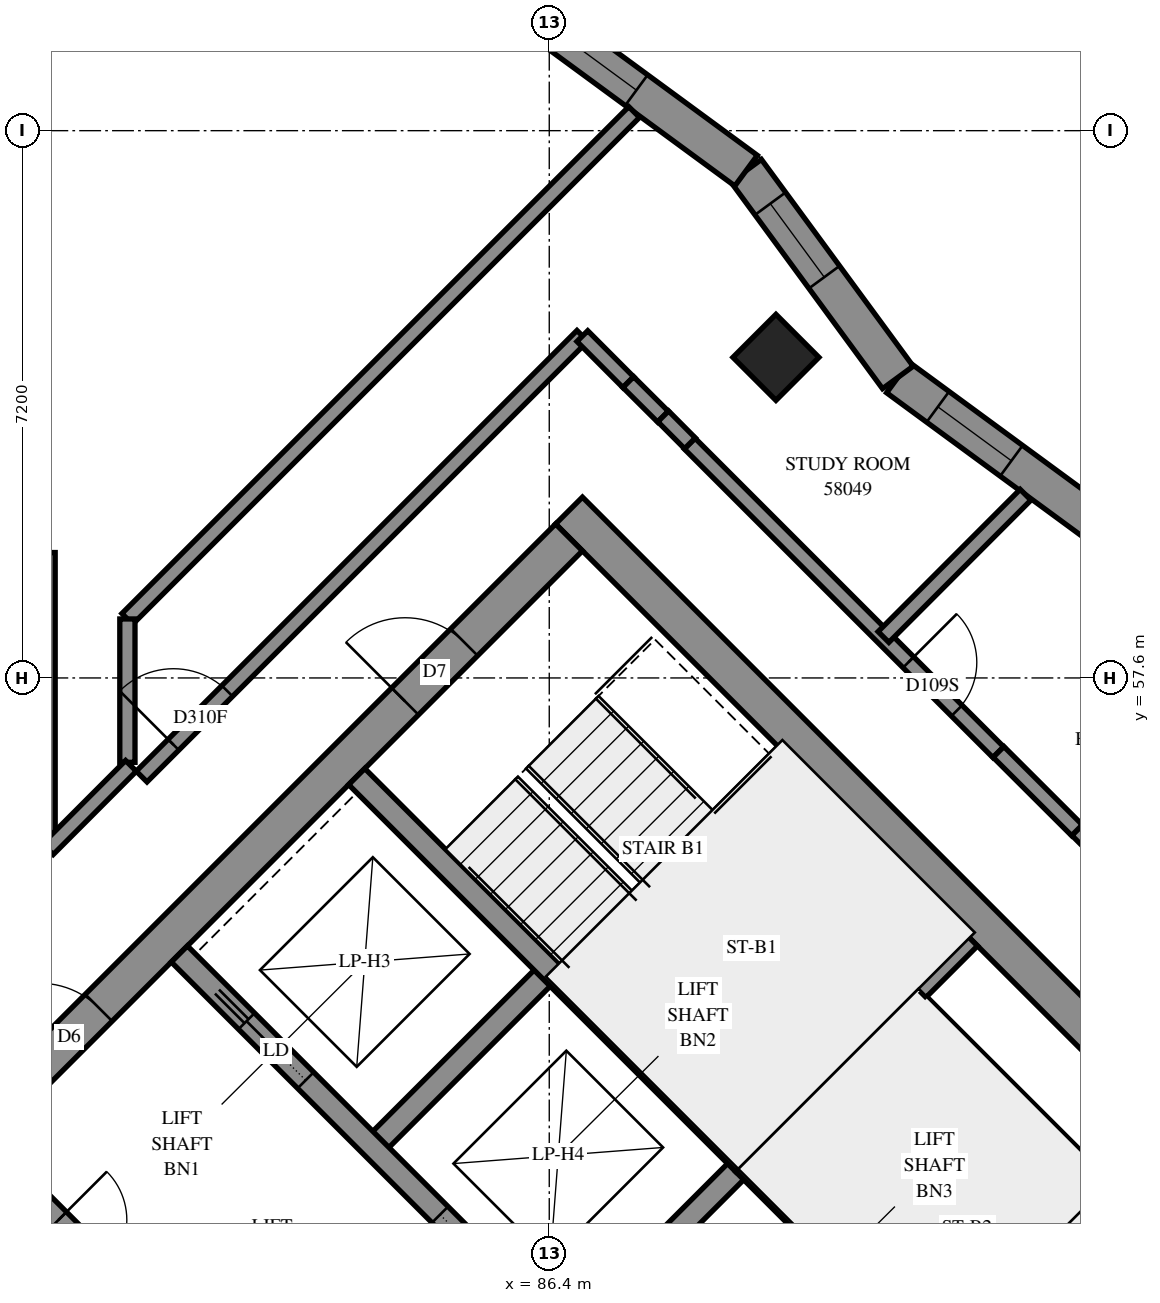
"""IFC4 building model, lengths in metres.
Left out: names, types, materials, properties, quantities, classifications, styles, units other than length and angle.
Written with IfcOpenShell. Run it as: python <this file> out.ifc"""

import sys

from ifc_helpers import new_model, si_unit, direction, frame, frame_2d, origin, origin_2d, place, context, subcontext, project, spatial, polyline, rectangle, outline, extrude, element, fill, save


model = new_model("IFC4")
c1 = context("Model", 3, precision=1e-05, world=origin(), true_north=direction((0.0, 1.0)))
c2 = subcontext(c1, "Body", "Model", "MODEL_VIEW")
j1 = project(units=[si_unit("LENGTHUNIT", "METRE"), si_unit("PLANEANGLEUNIT", "RADIAN")], contexts=[c1])
p1 = place(None, origin())
s1 = spatial("IfcSite", under=j1, at=p1, CompositionType="ELEMENT")
p2 = place(p1, origin())
s2 = spatial("IfcBuilding", under=s1, at=p2, CompositionType="ELEMENT")
p3 = place(p2, frame((0.0, 0.0, 213.4)))
s3 = spatial("IfcBuildingStorey", under=s2, at=p3, CompositionType="ELEMENT", Elevation=213.4)
p4 = place(p3, frame((89.382, 61.818, 0.0), z_axis=(0.0, 0.0, 1.0), x_axis=(0.7071067812, -0.7071067812, 0.0)))
e1 = element("IfcColumn", 1, at=p4, inside=s3, PredefinedType="COLUMN", context=c2, shape_type="SweptSolid", body=[
    extrude(rectangle(XDim=0.8, YDim=0.8, at=origin_2d()), origin(), (0.0, 0.0, 1.0), 3.1),
])
p5 = place(p3, frame((86.66, 59.802, -0.3), z_axis=(0.0, 0.0, 1.0), x_axis=(0.7071067812, -0.7071067812, 0.0)))
e2 = element("IfcWall", 2, at=p5, inside=s3, PredefinedType="SHEAR", context=c2, shape_type="SweptSolid", body=[
    extrude(rectangle(XDim=15.4, YDim=0.5, at=frame_2d((7.7, 0.0))), origin(), (0.0, 0.0, 1.0), 2.7),
])
p6 = place(p5, frame((10.5, 0.0, 0.3)))
e3 = element("IfcOpeningElement", 3, at=p6, cuts=e2, PredefinedType="OPENING", context=c2, shape_type="SweptSolid", body=[
    extrude(rectangle(XDim=0.8, YDim=2.1, at=frame_2d((0.4, 1.05))), frame((0.0, 0.26, 0.0), z_axis=(0.0, -1.0, 0.0), x_axis=(1.0, 0.0, 0.0)), (0.0, 0.0, 1.0), 0.52),
])
p7 = place(p3, frame((76.478, 49.267, -0.3), z_axis=(0.0, 0.0, 1.0), x_axis=(0.7071067812, 0.7071067812, 0.0)))
e4 = element("IfcWall", 4, at=p7, inside=s3, PredefinedType="SHEAR", context=c2, shape_type="SweptSolid", body=[
    extrude(rectangle(XDim=14.4, YDim=0.5, at=frame_2d((7.2, 0.0))), origin(), (0.0, 0.0, 1.0), 2.7),
])
p8 = place(p7, frame((4.55, 0.0, 0.3)))
e5 = element("IfcOpeningElement", 5, at=p8, cuts=e4, PredefinedType="OPENING", context=c2, shape_type="SweptSolid", body=[
    extrude(rectangle(XDim=1.1, YDim=2.1, at=frame_2d((0.55, 1.05))), frame((0.0, 0.26, 0.0), z_axis=(0.0, -1.0, 0.0), x_axis=(1.0, 0.0, 0.0)), (0.0, 0.0, 1.0), 0.52),
])
p9 = place(p7, frame((11.35, 0.0, 0.3)))
e6 = element("IfcOpeningElement", 6, at=p9, cuts=e4, PredefinedType="OPENING", context=c2, shape_type="SweptSolid", body=[
    extrude(rectangle(XDim=1.1, YDim=2.1, at=frame_2d((0.55, 1.05))), frame((0.0, 0.26, 0.0), z_axis=(0.0, -1.0, 0.0), x_axis=(1.0, 0.0, 0.0)), (0.0, 0.0, 1.0), 0.52),
])
p10 = place(p3, frame((84.079, 51.423, 0.0), z_axis=(0.0, 0.0, 1.0), x_axis=(0.7071219326, 0.7070916295, 0.0)))
e7 = element("IfcWall", 7, at=p10, inside=s3, PredefinedType="SOLIDWALL", context=c2, shape_type="SweptSolid", body=[
    extrude(rectangle(XDim=3.3, YDim=0.3, at=frame_2d((1.65, 0.0))), origin(), (0.0, 0.0, 1.0), 3.1),
])
p11 = place(p3, frame((86.625, 48.878, 0.0), z_axis=(0.0, 0.0, 1.0), x_axis=(0.7071067812, 0.7071067812, 0.0)))
e8 = element("IfcWall", 8, at=p11, inside=s3, PredefinedType="SOLIDWALL", context=c2, shape_type="SweptSolid", body=[
    extrude(rectangle(XDim=3.3, YDim=0.3, at=frame_2d((1.65, 0.0))), origin(), (0.0, 0.0, 1.0), 3.1),
])
p12 = place(p3, frame((78.988, 51.423, 0.0), z_axis=(0.0, 0.0, 1.0), x_axis=(0.7071067812, -0.7071067812, 0.0)))
e9 = element("IfcWall", 9, at=p12, inside=s3, PredefinedType="SOLIDWALL", context=c2, shape_type="SweptSolid", body=[
    extrude(rectangle(XDim=14.4, YDim=0.3, at=frame_2d((7.2, 0.0))), origin(), (0.0, 0.0, 1.0), 3.1),
])
p13 = place(p12, frame((1.35, 0.0, 0.0)))
e10 = element("IfcOpeningElement", 10, at=p13, cuts=e9, PredefinedType="OPENING", context=c2, shape_type="SweptSolid", body=[
    extrude(rectangle(XDim=0.9, YDim=2.1, at=frame_2d((0.45, 1.05))), frame((0.0, 0.16, 0.0), z_axis=(0.0, -1.0, 0.0), x_axis=(1.0, 0.0, 0.0)), (0.0, 0.0, 1.0), 0.32),
])
p14 = place(p12, frame((4.95, 0.0, 0.0)))
e11 = element("IfcOpeningElement", 11, at=p14, cuts=e9, PredefinedType="OPENING", context=c2, shape_type="SweptSolid", body=[
    extrude(rectangle(XDim=0.9, YDim=2.1, at=frame_2d((0.45, 1.05))), frame((0.0, 0.16, 0.0), z_axis=(0.0, -1.0, 0.0), x_axis=(1.0, 0.0, 0.0)), (0.0, 0.0, 1.0), 0.32),
])
p15 = place(p12, frame((8.55, 0.0, 0.0)))
e12 = element("IfcOpeningElement", 12, at=p15, cuts=e9, PredefinedType="OPENING", context=c2, shape_type="SweptSolid", body=[
    extrude(rectangle(XDim=0.9, YDim=2.1, at=frame_2d((0.45, 1.05))), frame((0.0, 0.16, 0.0), z_axis=(0.0, -1.0, 0.0), x_axis=(1.0, 0.0, 0.0)), (0.0, 0.0, 1.0), 0.32),
])
p16 = place(p12, frame((12.05, 0.0, 0.0)))
e13 = element("IfcOpeningElement", 13, at=p16, cuts=e9, PredefinedType="OPENING", context=c2, shape_type="SweptSolid", body=[
    extrude(rectangle(XDim=1.1, YDim=2.1, at=frame_2d((0.55, 1.05))), frame((0.0, 0.16, 0.0), z_axis=(0.0, -1.0, 0.0), x_axis=(1.0, 0.0, 0.0)), (0.0, 0.0, 1.0), 0.32),
])
p17 = place(p3, frame((81.534, 53.969, 0.0), z_axis=(0.0, 0.0, 1.0), x_axis=(0.707103309, -0.7071102534, 0.0)))
e14 = element("IfcWall", 14, at=p17, inside=s3, PredefinedType="SOLIDWALL", context=c2, shape_type="SweptSolid", body=[
    extrude(rectangle(XDim=14.4, YDim=0.3, at=frame_2d((7.2, 0.0))), origin(), (0.0, 0.0, 1.0), 3.1),
])
p18 = place(p17, frame((1.25, 0.0, 0.0)))
e15 = element("IfcOpeningElement", 15, at=p18, cuts=e14, PredefinedType="OPENING", context=c2, shape_type="SweptSolid", body=[
    extrude(rectangle(XDim=1.1, YDim=2.1, at=frame_2d((0.55, 1.05))), frame((0.0, 0.16, 0.0), z_axis=(0.0, -1.0, 0.0), x_axis=(1.0, 0.0, 0.0)), (0.0, 0.0, 1.0), 0.32),
])
p19 = place(p17, frame((4.85, 0.0, 0.0)))
e16 = element("IfcOpeningElement", 16, at=p19, cuts=e14, PredefinedType="OPENING", context=c2, shape_type="SweptSolid", body=[
    extrude(rectangle(XDim=1.1, YDim=2.1, at=frame_2d((0.55, 1.05))), frame((0.0, 0.16, 0.0), z_axis=(0.0, -1.0, 0.0), x_axis=(1.0, 0.0, 0.0)), (0.0, 0.0, 1.0), 0.32),
])
p20 = place(p17, frame((8.45, 0.0, 0.0)))
e17 = element("IfcOpeningElement", 17, at=p20, cuts=e14, PredefinedType="OPENING", context=c2, shape_type="SweptSolid", body=[
    extrude(rectangle(XDim=1.1, YDim=2.1, at=frame_2d((0.55, 1.05))), frame((0.0, 0.16, 0.0), z_axis=(0.0, -1.0, 0.0), x_axis=(1.0, 0.0, 0.0)), (0.0, 0.0, 1.0), 0.32),
])
p21 = place(p17, frame((12.05, 0.0, 0.0)))
e18 = element("IfcOpeningElement", 18, at=p21, cuts=e14, PredefinedType="OPENING", context=c2, shape_type="SweptSolid", body=[
    extrude(rectangle(XDim=1.1, YDim=2.1, at=frame_2d((0.55, 1.05))), frame((0.0, 0.16, 0.0), z_axis=(0.0, -1.0, 0.0), x_axis=(1.0, 0.0, 0.0)), (0.0, 0.0, 1.0), 0.32),
])
for number, where, z_axis, x_axis in (
    (19, (83.867, 56.302, 0.0), (0.0, 0.0, 1.0), (0.707, -0.707, 0.0)),
    (20, (88.958, 51.211, 0.0), (0.0, 0.0, 1.0), (0.707, -0.707, 0.0)),
):
    element("IfcWall", number, at=place(p3, frame(where, z_axis=z_axis, x_axis=x_axis)), inside=s3, PredefinedType="SOLIDWALL", context=c2, shape_type="SweptSolid", body=[
        extrude(rectangle(XDim=7.2, YDim=0.3, at=frame_2d((3.6, 0.0))), origin(), (0.0, 0.0, 1.0), 3.1),
    ])
p22 = place(p3, frame((88.958, 51.211, 0.0), z_axis=(0.0, 0.0, 1.0), x_axis=(0.7071067812, 0.7071067812, 0.0)))
e21 = element("IfcWall", 21, at=p22, inside=s3, PredefinedType="SOLIDWALL", context=c2, shape_type="SweptSolid", body=[
    extrude(rectangle(XDim=4.2, YDim=0.3, at=frame_2d((2.1, 0.0))), origin(), (0.0, 0.0, 1.0), 3.1),
])
p23 = place(p3, frame((93.707, 59.556, 0.0), z_axis=(0.0, 0.0, 1.0), x_axis=(-0.8061901555, 0.5916565162, 0.0)))
e22 = element("IfcWall", 22, at=p23, inside=s3, PredefinedType="SOLIDWALL", context=c2, shape_type="SweptSolid", body=[
    extrude(outline(polyline([(-0.038, -0.25), (3.337, -0.25), (3.413, 0.25), (0.038, 0.25), (-0.038, -0.25)])), origin(), (0.0, 0.0, 1.0), 3.1),
])
p24 = place(p23, frame((1.522, 0.0, 0.45)))
e23 = element("IfcOpeningElement", 23, at=p24, cuts=e22, PredefinedType="OPENING", context=c2, shape_type="SweptSolid", body=[
    extrude(rectangle(XDim=1.2, YDim=2.5, at=frame_2d((0.6, 1.25))), frame((0.0, 0.26, 0.0), z_axis=(0.0, -1.0, 0.0), x_axis=(1.0, 0.0, 0.0)), (0.0, 0.0, 1.0), 0.52),
])
p25 = place(p3, frame((90.986, 61.553, 0.0), z_axis=(0.0, 0.0, 1.0), x_axis=(-0.5916565162, 0.8061901555, 0.0)))
e24 = element("IfcWall", 24, at=p25, inside=s3, PredefinedType="SOLIDWALL", context=c2, shape_type="SweptSolid", body=[
    extrude(outline(polyline([(0.038, -0.25), (3.413, -0.25), (3.337, 0.25), (-0.038, 0.25), (0.038, -0.25)])), origin(), (0.0, 0.0, 1.0), 3.1),
])
p26 = place(p25, frame((1.637, 0.0, 0.45)))
e25 = element("IfcOpeningElement", 25, at=p26, cuts=e24, PredefinedType="OPENING", context=c2, shape_type="SweptSolid", body=[
    extrude(rectangle(XDim=1.2, YDim=2.5, at=frame_2d((0.6, 1.25))), frame((0.0, 0.26, 0.0), z_axis=(0.0, -1.0, 0.0), x_axis=(1.0, 0.0, 0.0)), (0.0, 0.0, 1.0), 0.52),
])
p27 = place(p3, frame((88.99, 64.274, 0.0), z_axis=(0.0, 0.0, 1.0), x_axis=(-0.806200528, 0.5916423825, 0.0)))
e26 = element("IfcWall", 26, at=p27, inside=s3, PredefinedType="SOLIDWALL", context=c2, shape_type="SweptSolid", body=[
    extrude(outline(polyline([(-0.038, -0.25), (3.337, -0.25), (3.413, 0.25), (0.038, 0.25), (-0.038, -0.25)])), origin(), (0.0, 0.0, 1.0), 3.1),
])
p28 = place(p27, frame((1.789, 0.0, 0.45)))
e27 = element("IfcOpeningElement", 27, at=p28, cuts=e26, PredefinedType="OPENING", context=c2, shape_type="SweptSolid", body=[
    extrude(rectangle(XDim=1.2, YDim=2.5, at=frame_2d((0.6, 1.25))), frame((0.0, 0.26, 0.0), z_axis=(0.0, -1.0, 0.0), x_axis=(1.0, 0.0, 0.0)), (0.0, 0.0, 1.0), 0.52),
])
p29 = place(p3, frame((91.313, 53.354, 0.0), z_axis=(0.0, 0.0, 1.0), x_axis=(0.7071140275, -0.7070995348, 0.0)))
e28 = element("IfcWall", 28, at=p29, inside=s3, PredefinedType="PARTITIONING", context=c2, shape_type="SweptSolid", body=[
    extrude(rectangle(XDim=6.9, YDim=0.15, at=frame_2d((3.45, 0.0))), origin(), (0.0, 0.0, 1.0), 3.1),
])
p30 = place(p3, frame((80.849, 58.377, 0.0), z_axis=(0.0, 0.0, 1.0), x_axis=(0.7071067812, 0.7071067812, 0.0)))
e29 = element("IfcWall", 29, at=p30, inside=s3, PredefinedType="PARTITIONING", context=c2, shape_type="SweptSolid", body=[
    extrude(rectangle(XDim=9.43, YDim=0.2, at=frame_2d((4.715, 0.0))), origin(), (0.0, 0.0, 1.0), 3.1),
])
p31 = place(p3, frame((93.346, 55.599, 0.0), z_axis=(0.0, 0.0, 1.0), x_axis=(0.7071067812, -0.7071067812, 0.0)))
e30 = element("IfcWall", 30, at=p31, inside=s3, PredefinedType="PARTITIONING", context=c2, shape_type="SweptSolid", body=[
    extrude(rectangle(XDim=9.201, YDim=0.2, at=frame_2d((4.601, 0.0))), origin(), (0.0, 0.0, 1.0), 3.1),
])
p32 = place(p3, frame((81.037, 56.303, 0.0), z_axis=(0.0, 0.0, 1.0), x_axis=(0.7071067812, 0.7071067812, 0.0)))
e31 = element("IfcWall", 31, at=p32, inside=s3, PredefinedType="PARTITIONING", context=c2, shape_type="SweptSolid", body=[
    extrude(rectangle(XDim=8.2, YDim=0.2, at=frame_2d((4.1, 0.0))), origin(), (0.0, 0.0, 1.0), 3.1),
])
p33 = place(p32, frame((0.592, 0.0, 0.0)))
e32 = element("IfcOpeningElement", 32, at=p33, cuts=e31, PredefinedType="OPENING", context=c2, shape_type="SweptSolid", body=[
    extrude(rectangle(XDim=1.0, YDim=2.1, at=frame_2d((0.5, 1.05))), frame((0.0, 0.11, 0.0), z_axis=(0.0, -1.0, 0.0), x_axis=(1.0, 0.0, 0.0)), (0.0, 0.0, 1.0), 0.22),
])
p34 = place(p3, frame((88.247, 60.683, 0.0), z_axis=(0.0, 0.0, 1.0), x_axis=(0.7071067812, -0.7071067812, 0.0)))
e33 = element("IfcWall", 33, at=p34, inside=s3, PredefinedType="PARTITIONING", context=c2, shape_type="SweptSolid", body=[
    extrude(rectangle(XDim=5.742, YDim=0.2, at=frame_2d((2.871, 0.0))), origin(), (0.0, 0.0, 1.0), 3.1),
])
p35 = place(p34, frame((4.069, 0.0, 0.0)))
e34 = element("IfcOpeningElement", 34, at=p35, cuts=e33, PredefinedType="OPENING", context=c2, shape_type="SweptSolid", body=[
    extrude(rectangle(XDim=0.9, YDim=2.1, at=frame_2d((0.45, 1.05))), frame((0.0, 0.11, 0.0), z_axis=(0.0, -1.0, 0.0), x_axis=(1.0, 0.0, 0.0)), (0.0, 0.0, 1.0), 0.22),
])
p36 = place(p3, frame((79.8, 55.35, 0.0), z_axis=(0.0, 0.0, 1.0), x_axis=(0.0, 1.0, 0.0)))
e35 = element("IfcWall", 35, at=p36, inside=s3, PredefinedType="PARTITIONING", context=c2, shape_type="SweptSolid", body=[
    extrude(rectangle(XDim=3.9, YDim=0.2, at=frame_2d((1.95, 0.0))), origin(), (0.0, 0.0, 1.0), 3.1),
])
p37 = place(p3, frame((90.797, 58.139, 0.0), z_axis=(0.0, 0.0, 1.0), x_axis=(0.7066529259, 0.7075603454, 0.0)))
e36 = element("IfcWall", 36, at=p37, inside=s3, PredefinedType="PARTITIONING", context=c2, shape_type="SweptSolid", body=[
    extrude(rectangle(XDim=2.645, YDim=0.2, at=frame_2d((1.322, 0.0))), origin(), (0.0, 0.0, 1.0), 3.1),
])
p38 = place(p3, frame((80.85, 56.49, 0.0), z_axis=(0.0, 0.0, 1.0), x_axis=(0.0, 1.0, 0.0)))
e37 = element("IfcWall", 37, at=p38, inside=s3, PredefinedType="PARTITIONING", context=c2, shape_type="SweptSolid", body=[
    extrude(rectangle(XDim=1.886, YDim=0.2, at=frame_2d((0.943, 0.0))), origin(), (0.0, 0.0, 1.0), 3.1),
])
p39 = place(p3, frame((79.803, 55.347, 0.0), z_axis=(0.0, 0.0, 1.0), x_axis=(0.706460727, 0.7077522457, 0.0)))
e38 = element("IfcWall", 38, at=p39, inside=s3, PredefinedType="PARTITIONING", context=c2, shape_type="SweptSolid", body=[
    extrude(rectangle(XDim=1.549, YDim=0.2, at=frame_2d((0.774, 0.0))), origin(), (0.0, 0.0, 1.0), 3.1),
])
p40 = place(p3, frame((92.311, 56.627, 0.0), z_axis=(0.0, 0.0, 1.0), x_axis=(0.7077922938, -0.7064206033, 0.0)))
e39 = element("IfcWall", 39, at=p40, inside=s3, PredefinedType="PARTITIONING", context=c2, shape_type="SweptSolid", body=[
    extrude(rectangle(XDim=1.458, YDim=0.2, at=frame_2d((0.729, 0.0))), origin(), (0.0, 0.0, 1.0), 3.1),
])
p41 = place(p3, frame((86.835, 62.097, 0.0), z_axis=(0.0, 0.0, 1.0), x_axis=(0.7059370453, -0.7082745852, 0.0)))
e40 = element("IfcWall", 40, at=p41, inside=s3, PredefinedType="PARTITIONING", context=c2, shape_type="SweptSolid", body=[
    extrude(rectangle(XDim=0.856, YDim=0.2, at=frame_2d((0.428, 0.0))), origin(), (0.0, 0.0, 1.0), 3.1),
])
p42 = place(p3, frame((87.44, 61.492, 0.0), z_axis=(0.0, 0.0, 1.0), x_axis=(0.7086591505, -0.7055509963, 0.0)))
e41 = element("IfcWall", 41, at=p42, inside=s3, PredefinedType="PARTITIONING", context=c2, shape_type="SweptSolid", body=[
    extrude(rectangle(XDim=0.643, YDim=0.2, at=frame_2d((0.322, 0.0))), origin(), (0.0, 0.0, 1.0), 3.1),
])
p43 = place(p3, frame((87.899, 61.041, 0.0), z_axis=(0.0, 0.0, 1.0), x_axis=(0.7051008166, -0.7091070712, 0.0)))
e42 = element("IfcWall", 42, at=p43, inside=s3, PredefinedType="PARTITIONING", context=c2, shape_type="SweptSolid", body=[
    extrude(rectangle(XDim=0.499, YDim=0.2, at=frame_2d((0.25, 0.0))), origin(), (0.0, 0.0, 1.0), 3.1),
])
p44 = place(p24, origin())
e43 = element("IfcWindow", 43, at=p44, inside=s3, PartitioningType="SINGLE_PANEL", PredefinedType="WINDOW", context=c2, shape_type="SweptSolid", body=[
    extrude(rectangle(XDim=1.2, YDim=2.5, at=frame_2d((0.6, 1.25))), frame((0.0, 0.18, 0.0), z_axis=(0.0, -1.0, 0.0), x_axis=(1.0, 0.0, 0.0)), (0.0, 0.0, 1.0), 0.06),
])
fill(e23, e43)
p45 = place(p26, origin())
e44 = element("IfcWindow", 44, at=p45, inside=s3, PartitioningType="SINGLE_PANEL", PredefinedType="WINDOW", context=c2, shape_type="SweptSolid", body=[
    extrude(rectangle(XDim=1.2, YDim=2.5, at=frame_2d((0.6, 1.25))), frame((0.0, 0.18, 0.0), z_axis=(0.0, -1.0, 0.0), x_axis=(1.0, 0.0, 0.0)), (0.0, 0.0, 1.0), 0.06),
])
fill(e25, e44)
p46 = place(p28, origin())
e45 = element("IfcWindow", 45, at=p46, inside=s3, PartitioningType="SINGLE_PANEL", PredefinedType="WINDOW", context=c2, shape_type="SweptSolid", body=[
    extrude(rectangle(XDim=1.2, YDim=2.5, at=frame_2d((0.6, 1.25))), frame((0.0, 0.18, 0.0), z_axis=(0.0, -1.0, 0.0), x_axis=(1.0, 0.0, 0.0)), (0.0, 0.0, 1.0), 0.06),
])
fill(e27, e45)
p47 = place(p8, origin())
e46 = element("IfcDoor", 46, at=p47, inside=s3, OperationType="DOUBLE_DOOR_SINGLE_SWING", PredefinedType="DOOR", context=c2, shape_type="SweptSolid", body=[
    extrude(rectangle(XDim=1.1, YDim=2.1, at=frame_2d((0.55, 1.05))), frame((0.0, 0.025, 0.0), z_axis=(0.0, -1.0, 0.0), x_axis=(1.0, 0.0, 0.0)), (0.0, 0.0, 1.0), 0.05),
])
fill(e5, e46)
p48 = place(p9, origin())
e47 = element("IfcDoor", 47, at=p48, inside=s3, OperationType="SINGLE_SWING_LEFT", PredefinedType="DOOR", context=c2, shape_type="SweptSolid", body=[
    extrude(rectangle(XDim=1.1, YDim=2.1, at=frame_2d((0.55, 1.05))), frame((0.0, 0.025, 0.0), z_axis=(0.0, -1.0, 0.0), x_axis=(1.0, 0.0, 0.0)), (0.0, 0.0, 1.0), 0.05),
])
fill(e6, e47)
p49 = place(p13, origin())
e48 = element("IfcDoor", 48, at=p49, inside=s3, OperationType="SINGLE_SWING_LEFT", PredefinedType="DOOR", context=c2, shape_type="SweptSolid", body=[
    extrude(rectangle(XDim=0.9, YDim=2.1, at=frame_2d((0.45, 1.05))), frame((0.0, 0.025, 0.0), z_axis=(0.0, -1.0, 0.0), x_axis=(1.0, 0.0, 0.0)), (0.0, 0.0, 1.0), 0.05),
])
fill(e10, e48)
p50 = place(p18, origin())
e49 = element("IfcDoor", 49, at=p50, inside=s3, OperationType="SLIDING_TO_LEFT", PredefinedType="DOOR", context=c2, shape_type="SweptSolid", body=[
    extrude(rectangle(XDim=1.1, YDim=2.1, at=frame_2d((0.55, 1.05))), frame((0.0, 0.025, 0.0), z_axis=(0.0, -1.0, 0.0), x_axis=(1.0, 0.0, 0.0)), (0.0, 0.0, 1.0), 0.05),
])
fill(e15, e49)
p51 = place(p19, origin())
e50 = element("IfcDoor", 50, at=p51, inside=s3, OperationType="SLIDING_TO_RIGHT", PredefinedType="DOOR", context=c2, shape_type="SweptSolid", body=[
    extrude(rectangle(XDim=1.1, YDim=2.1, at=frame_2d((0.55, 1.05))), frame((0.0, 0.025, 0.0), z_axis=(0.0, -1.0, 0.0), x_axis=(1.0, 0.0, 0.0)), (0.0, 0.0, 1.0), 0.05),
])
fill(e16, e50)
p52 = place(p33, origin())
e51 = element("IfcDoor", 51, at=p52, inside=s3, OperationType="SINGLE_SWING_RIGHT", PredefinedType="DOOR", context=c2, shape_type="SweptSolid", body=[
    extrude(rectangle(XDim=1.0, YDim=2.1, at=frame_2d((0.5, 1.05))), frame((0.0, 0.025, 0.0), z_axis=(0.0, -1.0, 0.0), x_axis=(1.0, 0.0, 0.0)), (0.0, 0.0, 1.0), 0.05),
])
fill(e32, e51)
p53 = place(p35, origin())
e52 = element("IfcDoor", 52, at=p53, inside=s3, OperationType="SINGLE_SWING_RIGHT", PredefinedType="DOOR", context=c2, shape_type="SweptSolid", body=[
    extrude(rectangle(XDim=0.9, YDim=2.1, at=frame_2d((0.45, 1.05))), frame((0.0, 0.025, 0.0), z_axis=(0.0, -1.0, 0.0), x_axis=(1.0, 0.0, 0.0)), (0.0, 0.0, 1.0), 0.05),
])
fill(e34, e52)
save(model, sys.argv[1])
